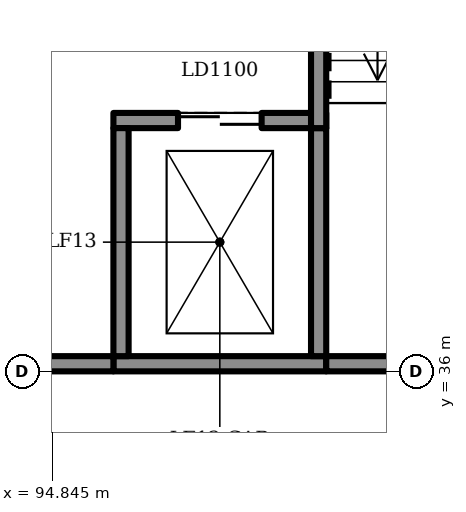
"""IFC4 building model, lengths in metres.
Left out: names, types, materials, properties, quantities, classifications, styles, units other than length and angle.
Written with IfcOpenShell. Run it as: python <this file> out.ifc"""

import sys

from ifc_helpers import new_model, si_unit, direction, frame, frame_2d, origin, place, context, subcontext, project, spatial, rectangle, extrude, element, fill, save


model = new_model("IFC4")
c1 = context("Model", 3, precision=1e-05, world=origin(), true_north=direction((0.0, 1.0)))
c2 = subcontext(c1, "Body", "Model", "MODEL_VIEW")
j1 = project(units=[si_unit("LENGTHUNIT", "METRE"), si_unit("PLANEANGLEUNIT", "RADIAN")], contexts=[c1])
p1 = place(None, origin())
s1 = spatial("IfcSite", under=j1, at=p1, CompositionType="ELEMENT")
p2 = place(p1, origin())
s2 = spatial("IfcBuilding", under=s1, at=p2, CompositionType="ELEMENT")
p3 = place(p2, origin())
s3 = spatial("IfcBuildingStorey", under=s2, at=p3, CompositionType="ELEMENT", Elevation=0.0)
p4 = place(p3, frame((95.65, 36.1, -1.1), z_axis=(0.0, 0.0, 1.0), x_axis=(1.0, 0.0, 0.0)))
e1 = element("IfcWall", 1, at=p4, inside=s3, PredefinedType="SOLIDWALL", context=c2, shape_type="SweptSolid", body=[
    extrude(rectangle(XDim=2.8, YDim=0.2, at=frame_2d((1.4, 0.0))), origin(), (0.0, 0.0, 1.0), 6.25),
])
p5 = place(p3, frame((95.65, 39.3, -1.1), z_axis=(0.0, 0.0, 1.0), x_axis=(1.0, 0.0, 0.0)))
e2 = element("IfcWall", 2, at=p5, inside=s3, PredefinedType="SOLIDWALL", context=c2, shape_type="SweptSolid", body=[
    extrude(rectangle(XDim=2.8, YDim=0.2, at=frame_2d((1.4, 0.0))), origin(), (0.0, 0.0, 1.0), 6.25),
])
p6 = place(p5, frame((0.85, 0.0, 1.1)))
e3 = element("IfcOpeningElement", 3, at=p6, cuts=e2, PredefinedType="OPENING", context=c2, shape_type="SweptSolid", body=[
    extrude(rectangle(XDim=1.1, YDim=2.1, at=frame_2d((0.55, 1.05))), frame((0.0, 0.11, 0.0), z_axis=(0.0, -1.0, 0.0), x_axis=(1.0, 0.0, 0.0)), (0.0, 0.0, 1.0), 0.22),
])
for number, where, z_axis, x_axis in (
    (4, (95.75, 36.2, -1.1), (0.0, 0.0, 1.0), (0.0, 1.0, 0.0)),
    (5, (98.35, 36.2, -1.1), (0.0, 0.0, 1.0), (0.0, 1.0, 0.0)),
):
    element("IfcWall", number, at=place(p3, frame(where, z_axis=z_axis, x_axis=x_axis)), inside=s3, PredefinedType="SOLIDWALL", context=c2, shape_type="SweptSolid", body=[
        extrude(rectangle(XDim=3.0, YDim=0.2, at=frame_2d((1.5, 0.0))), origin(), (0.0, 0.0, 1.0), 6.25),
    ])
p7 = place(p3, frame((92.654, 36.1, 0.0), z_axis=(0.0, 0.0, 1.0), x_axis=(1.0, 0.0, 0.0)))
e6 = element("IfcWall", 6, at=p7, inside=s3, PredefinedType="SOLIDWALL", context=c2, shape_type="SweptSolid", body=[
    extrude(rectangle(XDim=2.996, YDim=0.2, at=frame_2d((1.498, 0.0))), origin(), (0.0, 0.0, 1.0), 5.15),
])
p8 = place(p3, frame((98.45, 36.1, 0.0), z_axis=(0.0, 0.0, 1.0), x_axis=(1.0, 0.0, 0.0)))
e7 = element("IfcWall", 7, at=p8, inside=s3, PredefinedType="SOLIDWALL", context=c2, shape_type="SweptSolid", body=[
    extrude(rectangle(XDim=2.896, YDim=0.2, at=frame_2d((1.448, 0.0))), origin(), (0.0, 0.0, 1.0), 5.15),
])
p9 = place(p3, frame((98.35, 39.2, 0.0), z_axis=(0.0, 0.0, 1.0), x_axis=(0.0, 1.0, 0.0)))
e8 = element("IfcWall", 8, at=p9, inside=s3, PredefinedType="SOLIDWALL", context=c2, shape_type="SweptSolid", body=[
    extrude(rectangle(XDim=5.6, YDim=0.2, at=frame_2d((2.8, 0.0))), origin(), (0.0, 0.0, 1.0), 5.15),
])
p10 = place(p9, frame((4.35, 0.0, 0.0)))
e9 = element("IfcOpeningElement", 9, at=p10, cuts=e8, PredefinedType="OPENING", context=c2, shape_type="SweptSolid", body=[
    extrude(rectangle(XDim=1.1, YDim=2.1, at=frame_2d((0.55, 1.05))), frame((0.0, 0.11, 0.0), z_axis=(0.0, -1.0, 0.0), x_axis=(1.0, 0.0, 0.0)), (0.0, 0.0, 1.0), 0.22),
])
p11 = place(p6, origin())
e10 = element("IfcDoor", 10, at=p11, inside=s3, OperationType="SLIDING_TO_LEFT", PredefinedType="DOOR", context=c2, shape_type="SweptSolid", body=[
    extrude(rectangle(XDim=1.1, YDim=2.1, at=frame_2d((0.55, 1.05))), frame((0.0, 0.025, 0.0), z_axis=(0.0, -1.0, 0.0), x_axis=(1.0, 0.0, 0.0)), (0.0, 0.0, 1.0), 0.05),
])
fill(e3, e10)
save(model, sys.argv[1])
